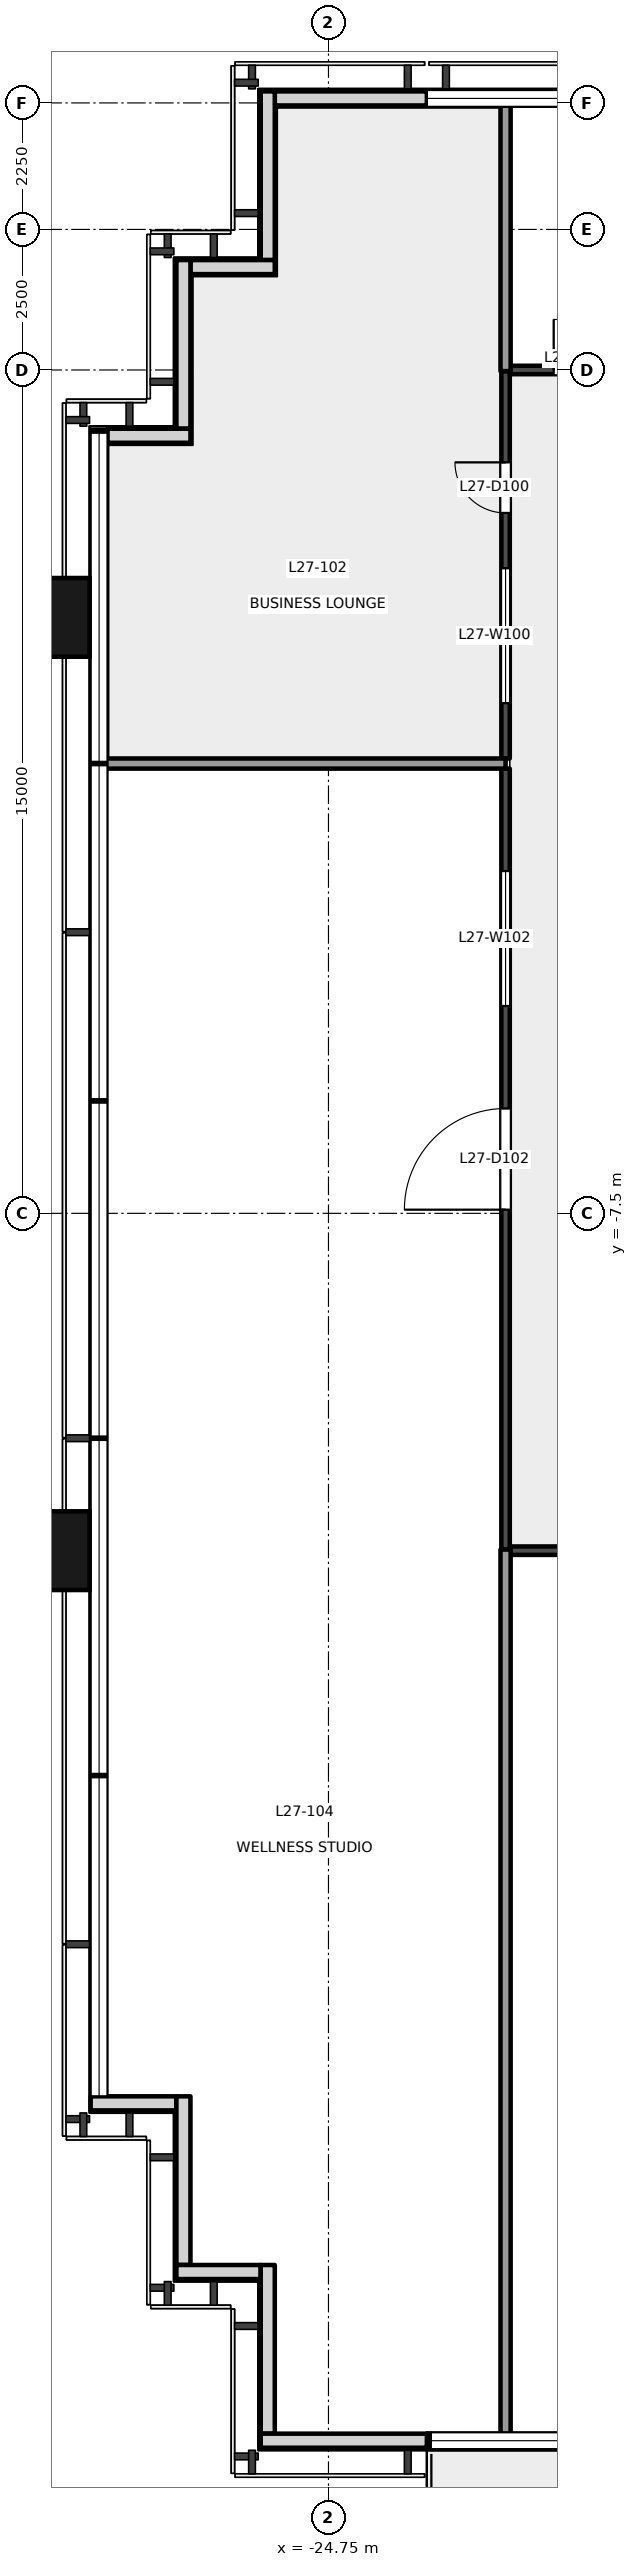
"""IFC4 building model, lengths in metres.
Left out: names, types, materials, properties, quantities, classifications, styles, units other than length and angle.
Written with IfcOpenShell. Run it as: python <this file> out.ifc"""

import sys

from ifc_helpers import new_model, si_unit, direction, frame, frame_2d, origin, origin_2d, place, context, subcontext, project, spatial, rectangle, extrude, element, fill, save


model = new_model("IFC4")
c1 = context("Model", 3, precision=1e-05, world=origin(), true_north=direction((0.0, 1.0)))
c2 = subcontext(c1, "Body", "Model", "MODEL_VIEW")
j1 = project(units=[si_unit("LENGTHUNIT", "METRE"), si_unit("PLANEANGLEUNIT", "RADIAN")], contexts=[c1])
p1 = place(None, origin())
s1 = spatial("IfcSite", under=j1, at=p1, CompositionType="ELEMENT")
p2 = place(p1, origin())
s2 = spatial("IfcBuilding", under=s1, at=p2, CompositionType="ELEMENT")
p3 = place(p2, frame((0.0, 0.0, 120.7)))
s3 = spatial("IfcBuildingStorey", under=s2, at=p3, CompositionType="ELEMENT", Elevation=120.7)
for number, where, z_axis, x_axis in (
    (1, (-29.9, -13.5, -0.2), (0.0, 0.0, 1.0), (0.0, 1.0, 0.0)),
    (2, (-29.9, 3.1, -0.2), (0.0, 0.0, 1.0), (0.0, 1.0, 0.0)),
):
    element("IfcColumn", number, at=place(p3, frame(where, z_axis=z_axis, x_axis=x_axis)), inside=s3, PredefinedType="COLUMN", context=c2, shape_type="SweptSolid", body=[
        extrude(rectangle(XDim=1.4, YDim=1.8, at=origin_2d()), origin(), (0.0, 0.0, 1.0), 5.4),
    ])
p4 = place(p3, frame((-23.0, 12.33, 0.0), z_axis=(0.0, 0.0, 1.0), x_axis=(-1.0, 0.0, 0.0)))
e3 = element("IfcWall", 3, at=p4, inside=s3, PredefinedType="SOLIDWALL", context=c2, shape_type="SweptSolid", body=[
    extrude(rectangle(XDim=2.705, YDim=0.25, at=frame_2d((1.353, 0.0))), origin(), (0.0, 0.0, 1.0), 5.2),
])
p5 = place(p3, frame((-25.83, 12.455, 0.0), z_axis=(0.0, 0.0, 1.0), x_axis=(0.0, -1.0, 0.0)))
e4 = element("IfcWall", 4, at=p5, inside=s3, PredefinedType="SOLIDWALL", context=c2, shape_type="SweptSolid", body=[
    extrude(rectangle(XDim=3.0, YDim=0.25, at=frame_2d((1.5, 0.0))), origin(), (0.0, 0.0, 1.0), 5.2),
])
p6 = place(p3, frame((-25.705, 9.33, 0.0), z_axis=(0.0, 0.0, 1.0), x_axis=(-1.0, 0.0, 0.0)))
e5 = element("IfcWall", 5, at=p6, inside=s3, PredefinedType="SOLIDWALL", context=c2, shape_type="SweptSolid", body=[
    extrude(rectangle(XDim=1.5, YDim=0.25, at=frame_2d((0.75, 0.0))), origin(), (0.0, 0.0, 1.0), 5.2),
])
p7 = place(p3, frame((-27.33, 9.455, 0.0), z_axis=(0.0, 0.0, 1.0), x_axis=(0.0, -1.0, 0.0)))
e6 = element("IfcWall", 6, at=p7, inside=s3, PredefinedType="SOLIDWALL", context=c2, shape_type="SweptSolid", body=[
    extrude(rectangle(XDim=3.0, YDim=0.25, at=frame_2d((1.5, 0.0))), origin(), (0.0, 0.0, 1.0), 5.2),
])
p8 = place(p3, frame((-27.205, 6.33, 0.0), z_axis=(0.0, 0.0, 1.0), x_axis=(-1.0, 0.0, 0.0)))
e7 = element("IfcWall", 7, at=p8, inside=s3, PredefinedType="SOLIDWALL", context=c2, shape_type="SweptSolid", body=[
    extrude(rectangle(XDim=1.475, YDim=0.25, at=frame_2d((0.737, 0.0))), origin(), (0.0, 0.0, 1.0), 5.2),
])
p9 = place(p3, frame((-28.98, -23.33, 0.0), z_axis=(0.0, 0.0, 1.0), x_axis=(1.0, 0.0, 0.0)))
e8 = element("IfcWall", 8, at=p9, inside=s3, PredefinedType="SOLIDWALL", context=c2, shape_type="SweptSolid", body=[
    extrude(rectangle(XDim=1.525, YDim=0.25, at=frame_2d((0.762, 0.0))), origin(), (0.0, 0.0, 1.0), 5.2),
])
p10 = place(p3, frame((-27.33, -23.205, 0.0), z_axis=(0.0, 0.0, 1.0), x_axis=(0.0, -1.0, 0.0)))
e9 = element("IfcWall", 9, at=p10, inside=s3, PredefinedType="SOLIDWALL", context=c2, shape_type="SweptSolid", body=[
    extrude(rectangle(XDim=3.0, YDim=0.25, at=frame_2d((1.5, 0.0))), origin(), (0.0, 0.0, 1.0), 5.2),
])
p11 = place(p3, frame((-27.455, -26.33, 0.0), z_axis=(0.0, 0.0, 1.0), x_axis=(1.0, 0.0, 0.0)))
e10 = element("IfcWall", 10, at=p11, inside=s3, PredefinedType="SOLIDWALL", context=c2, shape_type="SweptSolid", body=[
    extrude(rectangle(XDim=1.5, YDim=0.25, at=frame_2d((0.75, 0.0))), origin(), (0.0, 0.0, 1.0), 5.2),
])
p12 = place(p3, frame((-25.83, -26.205, 0.0), z_axis=(0.0, 0.0, 1.0), x_axis=(0.0, -1.0, 0.0)))
e11 = element("IfcWall", 11, at=p12, inside=s3, PredefinedType="SOLIDWALL", context=c2, shape_type="SweptSolid", body=[
    extrude(rectangle(XDim=3.0, YDim=0.25, at=frame_2d((1.5, 0.0))), origin(), (0.0, 0.0, 1.0), 5.2),
])
p13 = place(p3, frame((-25.955, -29.33, 0.0), z_axis=(0.0, 0.0, 1.0), x_axis=(1.0, 0.0, 0.0)))
e12 = element("IfcWall", 12, at=p13, inside=s3, PredefinedType="SOLIDWALL", context=c2, shape_type="SweptSolid", body=[
    extrude(rectangle(XDim=2.955, YDim=0.25, at=frame_2d((1.478, 0.0))), origin(), (0.0, 0.0, 1.0), 5.2),
])
p14 = place(p3, frame((-21.6, 0.59, 0.0), z_axis=(0.0, 0.0, 1.0), x_axis=(0.0, 1.0, 0.0)))
e13 = element("IfcWall", 13, at=p14, inside=s3, PredefinedType="PARTITIONING", context=c2, shape_type="SweptSolid", body=[
    extrude(rectangle(XDim=6.89, YDim=0.15, at=frame_2d((3.445, 0.0))), origin(), (0.0, 0.0, 1.0), 4.7),
])
p15 = place(p14, frame((4.367, 0.0, 0.0)))
e14 = element("IfcOpeningElement", 14, at=p15, cuts=e13, PredefinedType="OPENING", context=c2, shape_type="SweptSolid", body=[
    extrude(rectangle(XDim=0.9, YDim=2.1, at=frame_2d((0.45, 1.05))), frame((0.0, 0.085, 0.0), z_axis=(0.0, -1.0, 0.0), x_axis=(1.0, 0.0, 0.0)), (0.0, 0.0, 1.0), 0.171),
])
p16 = place(p14, frame((0.984, 0.0, 0.0)))
e15 = element("IfcOpeningElement", 15, at=p16, cuts=e13, PredefinedType="OPENING", context=c2, shape_type="SweptSolid", body=[
    extrude(rectangle(XDim=2.4, YDim=2.4, at=frame_2d((1.2, 1.2))), frame((0.0, 0.085, 0.0), z_axis=(0.0, -1.0, 0.0), x_axis=(1.0, 0.0, 0.0)), (0.0, 0.0, 1.0), 0.171),
])
p17 = place(p3, frame((-21.6, -13.48, 0.0), z_axis=(0.0, 0.0, 1.0), x_axis=(0.0, 1.0, 0.0)))
e16 = element("IfcWall", 16, at=p17, inside=s3, PredefinedType="PARTITIONING", context=c2, shape_type="SweptSolid", body=[
    extrude(rectangle(XDim=13.89, YDim=0.15, at=frame_2d((6.945, 0.0))), origin(), (0.0, 0.0, 1.0), 4.7),
])
p18 = place(p17, frame((6.045, 0.0, 0.0)))
e17 = element("IfcOpeningElement", 17, at=p18, cuts=e16, PredefinedType="OPENING", context=c2, shape_type="SweptSolid", body=[
    extrude(rectangle(XDim=1.8, YDim=2.1, at=frame_2d((0.9, 1.05))), frame((0.0, 0.085, 0.0), z_axis=(0.0, -1.0, 0.0), x_axis=(1.0, 0.0, 0.0)), (0.0, 0.0, 1.0), 0.171),
])
p19 = place(p17, frame((9.668, 0.0, 0.0)))
e18 = element("IfcOpeningElement", 18, at=p19, cuts=e16, PredefinedType="OPENING", context=c2, shape_type="SweptSolid", body=[
    extrude(rectangle(XDim=2.4, YDim=2.4, at=frame_2d((1.2, 1.2))), frame((0.0, 0.085, 0.0), z_axis=(0.0, -1.0, 0.0), x_axis=(1.0, 0.0, 0.0)), (0.0, 0.0, 1.0), 0.171),
])
p20 = place(p3, frame((-7.757, -13.5, 0.0), z_axis=(0.0, 0.0, 1.0), x_axis=(-1.0, 0.0, 0.0)))
e19 = element("IfcWall", 19, at=p20, inside=s3, PredefinedType="PARTITIONING", context=c2, shape_type="SweptSolid", body=[
    extrude(rectangle(XDim=13.768, YDim=0.15, at=frame_2d((6.884, 0.0))), origin(), (0.0, 0.0, 1.0), 4.3),
])
p21 = place(p20, frame((3.117, 0.0, 0.0)))
e20 = element("IfcOpeningElement", 20, at=p21, cuts=e19, PredefinedType="OPENING", context=c2, shape_type="SweptSolid", body=[
    extrude(rectangle(XDim=1.8, YDim=2.1, at=frame_2d((0.9, 1.05))), frame((0.0, 0.085, 0.0), z_axis=(0.0, -1.0, 0.0), x_axis=(1.0, 0.0, 0.0)), (0.0, 0.0, 1.0), 0.171),
])
p22 = place(p20, frame((8.135, 0.0, 0.0)))
e21 = element("IfcOpeningElement", 21, at=p22, cuts=e19, PredefinedType="OPENING", context=c2, shape_type="SweptSolid", body=[
    extrude(rectangle(XDim=2.4, YDim=2.4, at=frame_2d((1.2, 1.2))), frame((0.0, 0.085, 0.0), z_axis=(0.0, -1.0, 0.0), x_axis=(1.0, 0.0, 0.0)), (0.0, 0.0, 1.0), 0.171),
])
p23 = place(p3, frame((-21.525, 7.5, 0.0), z_axis=(0.0, 0.0, 1.0), x_axis=(1.0, 0.0, 0.0)))
e22 = element("IfcWall", 22, at=p23, inside=s3, PredefinedType="PARTITIONING", context=c2, shape_type="SweptSolid", body=[
    extrude(rectangle(XDim=3.525, YDim=0.15, at=frame_2d((1.762, 0.0))), origin(), (0.0, 0.0, 1.0), 5.2),
])
p24 = place(p23, frame((0.781, 0.0, 0.0)))
e23 = element("IfcOpeningElement", 23, at=p24, cuts=e22, PredefinedType="OPENING", context=c2, shape_type="SweptSolid", body=[
    extrude(rectangle(XDim=0.9, YDim=2.1, at=frame_2d((0.45, 1.05))), frame((0.0, 0.085, 0.0), z_axis=(0.0, -1.0, 0.0), x_axis=(1.0, 0.0, 0.0)), (0.0, 0.0, 1.0), 0.171),
])
p25 = place(p3, frame((-21.6, 0.5, 0.0), z_axis=(0.0, 0.0, 1.0), x_axis=(-1.0, 0.0, 0.0)))
e24 = element("IfcWall", 24, at=p25, inside=s3, PredefinedType="PARTITIONING", context=c2, shape_type="SweptSolid", body=[
    extrude(rectangle(XDim=7.14, YDim=0.18, at=frame_2d((3.57, 0.0))), origin(), (0.0, 0.0, 1.0), 5.2),
])
p26 = place(p3, frame((-21.6, 12.24, 0.0), z_axis=(0.0, 0.0, 1.0), x_axis=(0.0, -1.0, 0.0)))
e25 = element("IfcWall", 25, at=p26, inside=s3, PredefinedType="PARTITIONING", context=c2, shape_type="SweptSolid", body=[
    extrude(rectangle(XDim=4.76, YDim=0.18, at=frame_2d((2.38, 0.0))), origin(), (0.0, 0.0, 1.0), 5.2),
])
p27 = place(p3, frame((-21.6, -13.48, 0.0), z_axis=(0.0, 0.0, 1.0), x_axis=(0.0, -1.0, 0.0)))
e26 = element("IfcWall", 26, at=p27, inside=s3, PredefinedType="PARTITIONING", context=c2, shape_type="SweptSolid", body=[
    extrude(rectangle(XDim=15.76, YDim=0.18, at=frame_2d((7.88, 0.0))), origin(), (0.0, 0.0, 1.0), 5.2),
])
p28 = place(p15, origin())
e27 = element("IfcDoor", 27, at=p28, inside=s3, OperationType="SINGLE_SWING_RIGHT", PredefinedType="DOOR", context=c2, shape_type="SweptSolid", body=[
    extrude(rectangle(XDim=0.9, YDim=2.1, at=frame_2d((0.45, 1.05))), frame((0.0, 0.025, 0.0), z_axis=(0.0, -1.0, 0.0), x_axis=(1.0, 0.0, 0.0)), (0.0, 0.0, 1.0), 0.05),
])
fill(e14, e27)
p29 = place(p18, origin())
e28 = element("IfcDoor", 28, at=p29, inside=s3, OperationType="DOUBLE_DOOR_SINGLE_SWING", PredefinedType="DOOR", context=c2, shape_type="SweptSolid", body=[
    extrude(rectangle(XDim=1.8, YDim=2.1, at=frame_2d((0.9, 1.05))), frame((0.0, 0.025, 0.0), z_axis=(0.0, -1.0, 0.0), x_axis=(1.0, 0.0, 0.0)), (0.0, 0.0, 1.0), 0.05),
])
fill(e17, e28)
p30 = place(p24, origin())
e29 = element("IfcDoor", 29, at=p30, inside=s3, OperationType="SINGLE_SWING_LEFT", PredefinedType="DOOR", context=c2, shape_type="SweptSolid", body=[
    extrude(rectangle(XDim=0.9, YDim=2.1, at=frame_2d((0.45, 1.05))), frame((0.0, 0.025, 0.0), z_axis=(0.0, -1.0, 0.0), x_axis=(1.0, 0.0, 0.0)), (0.0, 0.0, 1.0), 0.05),
])
fill(e23, e29)
p31 = place(p16, origin())
e30 = element("IfcWindow", 30, at=p31, inside=s3, PartitioningType="SINGLE_PANEL", PredefinedType="WINDOW", context=c2, shape_type="SweptSolid", body=[
    extrude(rectangle(XDim=2.4, YDim=2.4, at=frame_2d((1.2, 1.2))), frame((0.0, 0.03, 0.0), z_axis=(0.0, -1.0, 0.0), x_axis=(1.0, 0.0, 0.0)), (0.0, 0.0, 1.0), 0.06),
])
fill(e15, e30)
p32 = place(p19, origin())
e31 = element("IfcWindow", 31, at=p32, inside=s3, PartitioningType="SINGLE_PANEL", PredefinedType="WINDOW", context=c2, shape_type="SweptSolid", body=[
    extrude(rectangle(XDim=2.4, YDim=2.4, at=frame_2d((1.2, 1.2))), frame((0.0, 0.03, 0.0), z_axis=(0.0, -1.0, 0.0), x_axis=(1.0, 0.0, 0.0)), (0.0, 0.0, 1.0), 0.06),
])
fill(e18, e31)
save(model, sys.argv[1])
